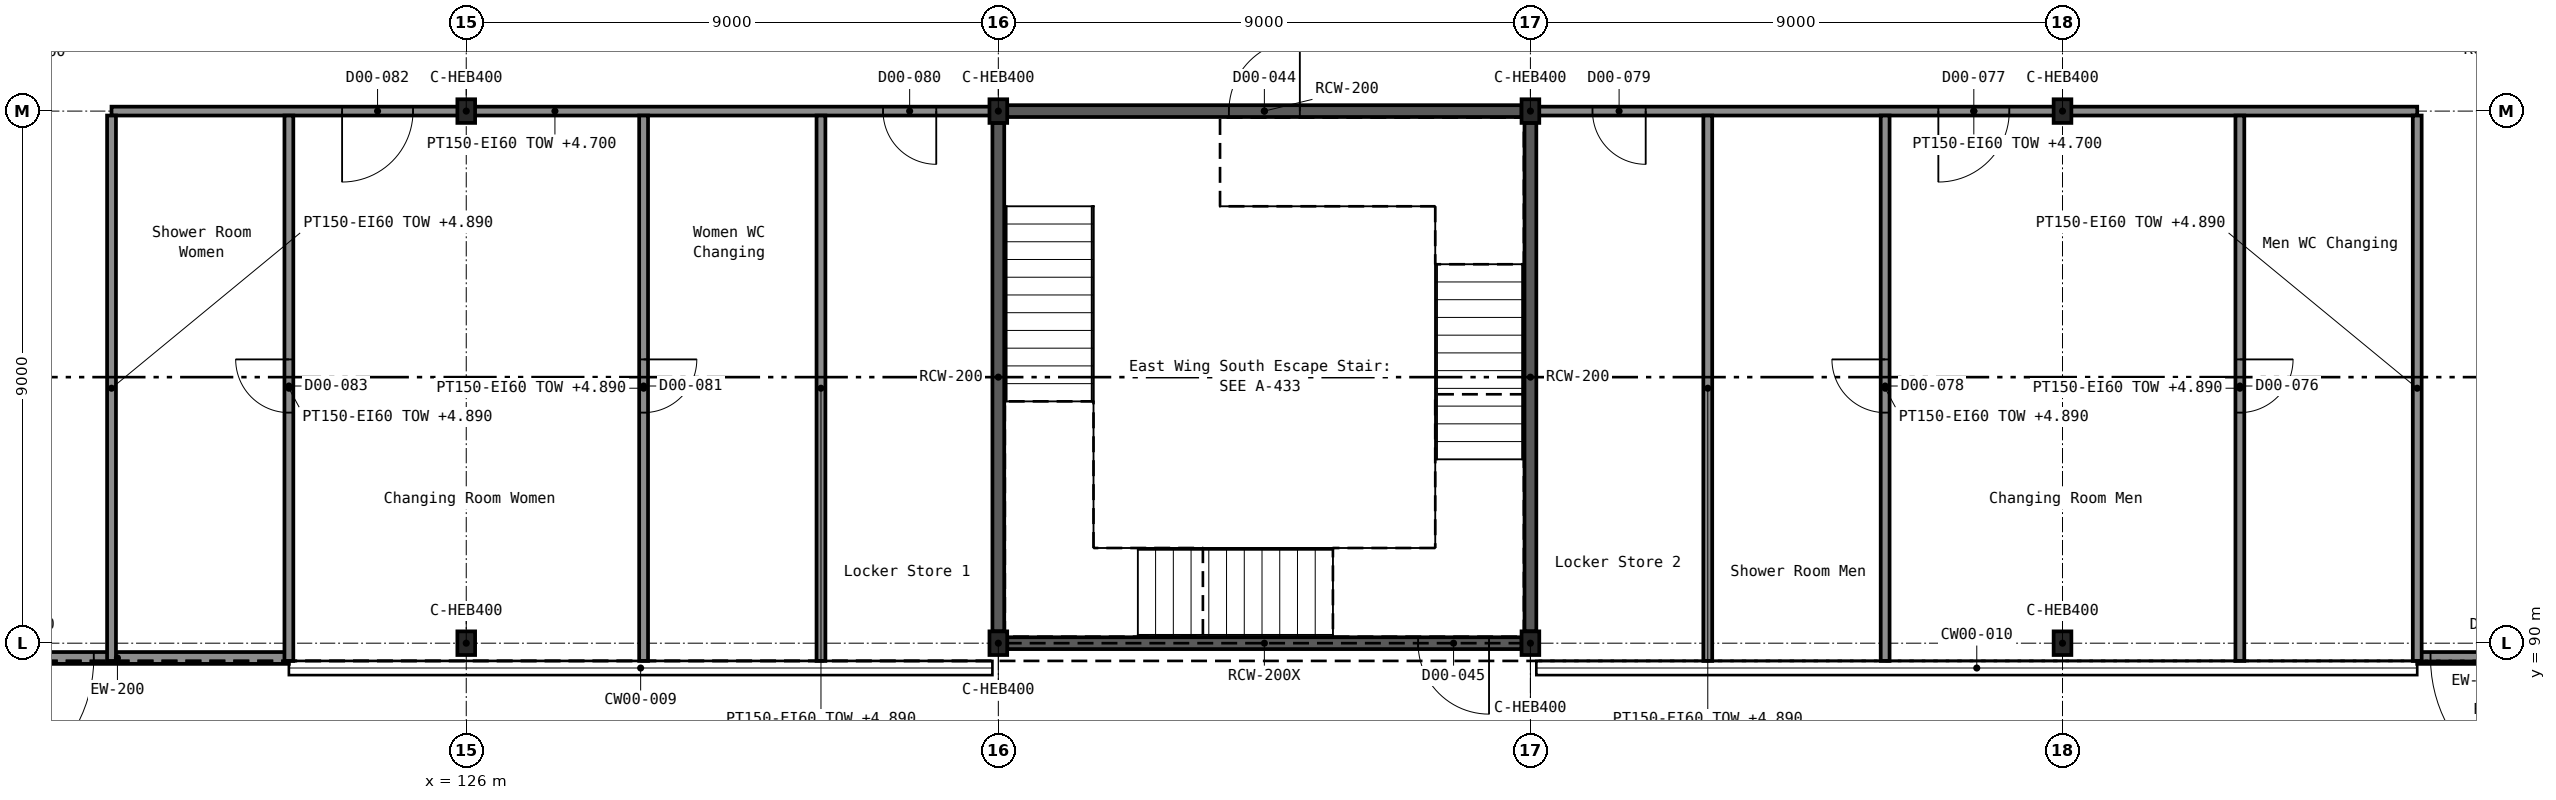
"""IFC4 building model, lengths in metres.
Left out: names, types, materials, properties, quantities, classifications, styles, units other than length and angle.
Written with IfcOpenShell. Run it as: python <this file> out.ifc"""

import sys

from ifc_helpers import new_model, si_unit, direction, frame, frame_2d, origin, origin_2d, place, context, subcontext, project, spatial, rectangle, i_section, extrude, element, fill, save


model = new_model("IFC4")
c1 = context("Model", 3, precision=1e-05, world=origin(), true_north=direction((0.0, 1.0)))
c2 = subcontext(c1, "Body", "Model", "MODEL_VIEW")
j1 = project(units=[si_unit("LENGTHUNIT", "METRE"), si_unit("PLANEANGLEUNIT", "RADIAN")], contexts=[c1])
p1 = place(None, origin())
s1 = spatial("IfcSite", under=j1, at=p1, CompositionType="ELEMENT")
p2 = place(p1, origin())
s2 = spatial("IfcBuilding", under=s1, at=p2, CompositionType="ELEMENT")
p3 = place(p2, origin())
s3 = spatial("IfcBuildingStorey", under=s2, at=p3, CompositionType="ELEMENT", Elevation=0.0)
for number, where, z_axis, x_axis in (
    (1, (126.0, 90.0, -0.3), (0.0, 0.0, 1.0), (1.0, 0.0, 0.0)),
    (2, (135.0, 90.0, -0.3), (0.0, 0.0, 1.0), (1.0, 0.0, 0.0)),
    (3, (144.0, 90.0, -0.3), (0.0, 0.0, 1.0), (1.0, 0.0, 0.0)),
    (4, (153.0, 90.0, -0.3), (0.0, 0.0, 1.0), (1.0, 0.0, 0.0)),
    (5, (126.0, 99.0, -0.3), (0.0, 0.0, 1.0), (1.0, 0.0, 0.0)),
    (6, (135.0, 99.0, -0.3), (0.0, 0.0, 1.0), (1.0, 0.0, 0.0)),
    (7, (144.0, 99.0, -0.3), (0.0, 0.0, 1.0), (1.0, 0.0, 0.0)),
    (8, (153.0, 99.0, -0.3), (0.0, 0.0, 1.0), (1.0, 0.0, 0.0)),
):
    element("IfcColumn", number, at=place(p3, frame(where, z_axis=z_axis, x_axis=x_axis)), inside=s3, PredefinedType="COLUMN", context=c2, shape_type="SweptSolid", body=[
        extrude(i_section(OverallWidth=0.3, OverallDepth=0.4, WebThickness=0.013, FlangeThickness=0.024, FilletRadius=0.027, at=origin_2d()), origin(), (0.0, 0.0, 1.0), 5.7),
    ])
p4 = place(p3, frame((117.2, 89.75, 0.0), z_axis=(0.0, 0.0, 1.0), x_axis=(1.0, 0.0, 0.0)))
e9 = element("IfcWall", 9, at=p4, inside=s3, PredefinedType="SOLIDWALL", context=c2, shape_type="SweptSolid", body=[
    extrude(rectangle(XDim=5.8, YDim=0.2, at=frame_2d((2.9, 0.0))), origin(), (0.0, 0.0, 1.0), 5.4),
])
p5 = place(p4, frame((0.1, 0.0, 0.0)))
e10 = element("IfcOpeningElement", 10, at=p5, cuts=e9, PredefinedType="OPENING", context=c2, shape_type="SweptSolid", body=[
    extrude(rectangle(XDim=2.4, YDim=2.4, at=frame_2d((1.2, 1.2))), frame((0.0, 0.111, 0.0), z_axis=(0.0, -1.0, 0.0), x_axis=(1.0, 0.0, 0.0)), (0.0, 0.0, 1.0), 0.222),
])
p6 = place(p3, frame((159.0, 89.75, 0.0), z_axis=(0.0, 0.0, 1.0), x_axis=(1.0, 0.0, 0.0)))
e11 = element("IfcWall", 11, at=p6, inside=s3, PredefinedType="SOLIDWALL", context=c2, shape_type="SweptSolid", body=[
    extrude(rectangle(XDim=2.85, YDim=0.2, at=frame_2d((1.425, 0.0))), origin(), (0.0, 0.0, 1.0), 5.4),
])
p7 = place(p6, frame((0.225, 0.0, 0.0)))
e12 = element("IfcOpeningElement", 12, at=p7, cuts=e11, PredefinedType="OPENING", context=c2, shape_type="SweptSolid", body=[
    extrude(rectangle(XDim=2.4, YDim=2.4, at=frame_2d((1.2, 1.2))), frame((0.0, 0.111, 0.0), z_axis=(0.0, -1.0, 0.0), x_axis=(1.0, 0.0, 0.0)), (0.0, 0.0, 1.0), 0.222),
])
p8 = place(p3, frame((135.15, 90.0, 0.0), z_axis=(0.0, 0.0, 1.0), x_axis=(1.0, 0.0, 0.0)))
e13 = element("IfcWall", 13, at=p8, inside=s3, PredefinedType="SHEAR", context=c2, shape_type="SweptSolid", body=[
    extrude(rectangle(XDim=8.7, YDim=0.2, at=frame_2d((4.35, 0.0))), origin(), (0.0, 0.0, 1.0), 5.4),
])
p9 = place(p8, frame((6.95, 0.0, 0.0)))
e14 = element("IfcOpeningElement", 14, at=p9, cuts=e13, PredefinedType="OPENING", context=c2, shape_type="SweptSolid", body=[
    extrude(rectangle(XDim=1.2, YDim=2.1, at=frame_2d((0.6, 1.05))), frame((0.0, 0.111, 0.0), z_axis=(0.0, -1.0, 0.0), x_axis=(1.0, 0.0, 0.0)), (0.0, 0.0, 1.0), 0.222),
])
p10 = place(p3, frame((135.15, 99.0, 0.0), z_axis=(0.0, 0.0, 1.0), x_axis=(1.0, 0.0, 0.0)))
e15 = element("IfcWall", 15, at=p10, inside=s3, PredefinedType="SHEAR", context=c2, shape_type="SweptSolid", body=[
    extrude(rectangle(XDim=8.7, YDim=0.2, at=frame_2d((4.35, 0.0))), origin(), (0.0, 0.0, 1.0), 5.4),
])
p11 = place(p10, frame((3.75, 0.0, 0.0)))
e16 = element("IfcOpeningElement", 16, at=p11, cuts=e15, PredefinedType="OPENING", context=c2, shape_type="SweptSolid", body=[
    extrude(rectangle(XDim=1.2, YDim=2.1, at=frame_2d((0.6, 1.05))), frame((0.0, 0.111, 0.0), z_axis=(0.0, -1.0, 0.0), x_axis=(1.0, 0.0, 0.0)), (0.0, 0.0, 1.0), 0.222),
])
for number, where, z_axis, x_axis in (
    (17, (135.0, 90.2, 0.0), (0.0, 0.0, 1.0), (0.0, 1.0, 0.0)),
    (18, (144.0, 90.2, 0.0), (0.0, 0.0, 1.0), (0.0, 1.0, 0.0)),
):
    element("IfcWall", number, at=place(p3, frame(where, z_axis=z_axis, x_axis=x_axis)), inside=s3, PredefinedType="SHEAR", context=c2, shape_type="SweptSolid", body=[
        extrude(rectangle(XDim=8.6, YDim=0.2, at=frame_2d((4.3, 0.0))), origin(), (0.0, 0.0, 1.0), 5.4),
    ])
p12 = place(p3, frame((120.0, 99.0, 0.0), z_axis=(0.0, 0.0, 1.0), x_axis=(1.0, 0.0, 0.0)))
e19 = element("IfcWall", 19, at=p12, inside=s3, PredefinedType="PARTITIONING", context=c2, shape_type="SweptSolid", body=[
    extrude(rectangle(XDim=15.0, YDim=0.15, at=frame_2d((7.5, 0.0))), origin(), (0.0, 0.0, 1.0), 4.7),
])
p13 = place(p12, frame((13.05, 0.0, 0.0)))
e20 = element("IfcOpeningElement", 20, at=p13, cuts=e19, PredefinedType="OPENING", context=c2, shape_type="SweptSolid", body=[
    extrude(rectangle(XDim=0.9, YDim=2.4, at=frame_2d((0.45, 1.2))), frame((0.0, 0.086, 0.0), z_axis=(0.0, -1.0, 0.0), x_axis=(1.0, 0.0, 0.0)), (0.0, 0.0, 1.0), 0.172),
])
p14 = place(p12, frame((3.9, 0.0, 0.0)))
e21 = element("IfcOpeningElement", 21, at=p14, cuts=e19, PredefinedType="OPENING", context=c2, shape_type="SweptSolid", body=[
    extrude(rectangle(XDim=1.2, YDim=2.1, at=frame_2d((0.6, 1.05))), frame((0.0, 0.086, 0.0), z_axis=(0.0, -1.0, 0.0), x_axis=(1.0, 0.0, 0.0)), (0.0, 0.0, 1.0), 0.172),
])
p15 = place(p3, frame((144.0, 99.0, 0.0), z_axis=(0.0, 0.0, 1.0), x_axis=(1.0, 0.0, 0.0)))
e22 = element("IfcWall", 22, at=p15, inside=s3, PredefinedType="PARTITIONING", context=c2, shape_type="SweptSolid", body=[
    extrude(rectangle(XDim=15.0, YDim=0.15, at=frame_2d((7.5, 0.0))), origin(), (0.0, 0.0, 1.0), 4.7),
])
p16 = place(p15, frame((6.9, 0.0, 0.0)))
e23 = element("IfcOpeningElement", 23, at=p16, cuts=e22, PredefinedType="OPENING", context=c2, shape_type="SweptSolid", body=[
    extrude(rectangle(XDim=1.2, YDim=2.1, at=frame_2d((0.6, 1.05))), frame((0.0, 0.086, 0.0), z_axis=(0.0, -1.0, 0.0), x_axis=(1.0, 0.0, 0.0)), (0.0, 0.0, 1.0), 0.172),
])
p17 = place(p15, frame((1.05, 0.0, 0.0)))
e24 = element("IfcOpeningElement", 24, at=p17, cuts=e22, PredefinedType="OPENING", context=c2, shape_type="SweptSolid", body=[
    extrude(rectangle(XDim=0.9, YDim=2.4, at=frame_2d((0.45, 1.2))), frame((0.0, 0.086, 0.0), z_axis=(0.0, -1.0, 0.0), x_axis=(1.0, 0.0, 0.0)), (0.0, 0.0, 1.0), 0.172),
])
p18 = place(p3, frame((120.0, 89.7, 0.0), z_axis=(0.0, 0.0, 1.0), x_axis=(0.0, 1.0, 0.0)))
e25 = element("IfcWall", 25, at=p18, inside=s3, PredefinedType="PARTITIONING", context=c2, shape_type="SweptSolid", body=[
    extrude(rectangle(XDim=9.225, YDim=0.15, at=frame_2d((4.613, 0.0))), origin(), (0.0, 0.0, 1.0), 4.89),
])
p19 = place(p3, frame((123.0, 89.7, 0.0), z_axis=(0.0, 0.0, 1.0), x_axis=(0.0, 1.0, 0.0)))
e26 = element("IfcWall", 26, at=p19, inside=s3, PredefinedType="PARTITIONING", context=c2, shape_type="SweptSolid", body=[
    extrude(rectangle(XDim=9.225, YDim=0.15, at=frame_2d((4.613, 0.0))), origin(), (0.0, 0.0, 1.0), 4.89),
])
p20 = place(p19, frame((4.2, 0.0, 0.0)))
e27 = element("IfcOpeningElement", 27, at=p20, cuts=e26, PredefinedType="OPENING", context=c2, shape_type="SweptSolid", body=[
    extrude(rectangle(XDim=0.9, YDim=2.1, at=frame_2d((0.45, 1.05))), frame((0.0, 0.086, 0.0), z_axis=(0.0, -1.0, 0.0), x_axis=(1.0, 0.0, 0.0)), (0.0, 0.0, 1.0), 0.172),
])
p21 = place(p3, frame((129.0, 89.7, 0.0), z_axis=(0.0, 0.0, 1.0), x_axis=(0.0, 1.0, 0.0)))
e28 = element("IfcWall", 28, at=p21, inside=s3, PredefinedType="PARTITIONING", context=c2, shape_type="SweptSolid", body=[
    extrude(rectangle(XDim=9.225, YDim=0.15, at=frame_2d((4.613, 0.0))), origin(), (0.0, 0.0, 1.0), 4.89),
])
p22 = place(p21, frame((4.2, 0.0, 0.0)))
e29 = element("IfcOpeningElement", 29, at=p22, cuts=e28, PredefinedType="OPENING", context=c2, shape_type="SweptSolid", body=[
    extrude(rectangle(XDim=0.9, YDim=2.1, at=frame_2d((0.45, 1.05))), frame((0.0, 0.086, 0.0), z_axis=(0.0, -1.0, 0.0), x_axis=(1.0, 0.0, 0.0)), (0.0, 0.0, 1.0), 0.172),
])
for number, where, z_axis, x_axis in (
    (30, (132.0, 89.7, 0.0), (0.0, 0.0, 1.0), (0.0, 1.0, 0.0)),
    (31, (147.0, 89.7, 0.0), (0.0, 0.0, 1.0), (0.0, 1.0, 0.0)),
):
    element("IfcWall", number, at=place(p3, frame(where, z_axis=z_axis, x_axis=x_axis)), inside=s3, PredefinedType="PARTITIONING", context=c2, shape_type="SweptSolid", body=[
        extrude(rectangle(XDim=9.225, YDim=0.15, at=frame_2d((4.613, 0.0))), origin(), (0.0, 0.0, 1.0), 4.89),
    ])
p23 = place(p3, frame((150.0, 89.7, 0.0), z_axis=(0.0, 0.0, 1.0), x_axis=(0.0, 1.0, 0.0)))
e32 = element("IfcWall", 32, at=p23, inside=s3, PredefinedType="PARTITIONING", context=c2, shape_type="SweptSolid", body=[
    extrude(rectangle(XDim=9.225, YDim=0.15, at=frame_2d((4.613, 0.0))), origin(), (0.0, 0.0, 1.0), 4.89),
])
p24 = place(p23, frame((4.2, 0.0, 0.0)))
e33 = element("IfcOpeningElement", 33, at=p24, cuts=e32, PredefinedType="OPENING", context=c2, shape_type="SweptSolid", body=[
    extrude(rectangle(XDim=0.9, YDim=2.1, at=frame_2d((0.45, 1.05))), frame((0.0, 0.086, 0.0), z_axis=(0.0, -1.0, 0.0), x_axis=(1.0, 0.0, 0.0)), (0.0, 0.0, 1.0), 0.172),
])
p25 = place(p3, frame((156.0, 89.7, 0.0), z_axis=(0.0, 0.0, 1.0), x_axis=(0.0, 1.0, 0.0)))
e34 = element("IfcWall", 34, at=p25, inside=s3, PredefinedType="PARTITIONING", context=c2, shape_type="SweptSolid", body=[
    extrude(rectangle(XDim=9.225, YDim=0.15, at=frame_2d((4.613, 0.0))), origin(), (0.0, 0.0, 1.0), 4.89),
])
p26 = place(p25, frame((4.2, 0.0, 0.0)))
e35 = element("IfcOpeningElement", 35, at=p26, cuts=e34, PredefinedType="OPENING", context=c2, shape_type="SweptSolid", body=[
    extrude(rectangle(XDim=0.9, YDim=2.1, at=frame_2d((0.45, 1.05))), frame((0.0, 0.086, 0.0), z_axis=(0.0, -1.0, 0.0), x_axis=(1.0, 0.0, 0.0)), (0.0, 0.0, 1.0), 0.172),
])
p27 = place(p3, frame((159.0, 89.7, 0.0), z_axis=(0.0, 0.0, 1.0), x_axis=(0.0, 1.0, 0.0)))
e36 = element("IfcWall", 36, at=p27, inside=s3, PredefinedType="PARTITIONING", context=c2, shape_type="SweptSolid", body=[
    extrude(rectangle(XDim=9.225, YDim=0.15, at=frame_2d((4.613, 0.0))), origin(), (0.0, 0.0, 1.0), 4.89),
])
p28 = place(p5, frame((2.4, 0.0, 0.0), z_axis=(0.0, 0.0, 1.0), x_axis=(-1.0, 0.0, 0.0)))
e37 = element("IfcDoor", 37, at=p28, inside=s3, OperationType="DOUBLE_DOOR_DOUBLE_SWING", PredefinedType="DOOR", context=c2, shape_type="SweptSolid", body=[
    extrude(rectangle(XDim=2.4, YDim=2.4, at=frame_2d((1.2, 1.2))), frame((0.0, 0.025, 0.0), z_axis=(0.0, -1.0, 0.0), x_axis=(1.0, 0.0, 0.0)), (0.0, 0.0, 1.0), 0.05),
])
fill(e10, e37)
p29 = place(p7, frame((2.4, 0.0, 0.0), z_axis=(0.0, 0.0, 1.0), x_axis=(-1.0, 0.0, 0.0)))
e38 = element("IfcDoor", 38, at=p29, inside=s3, OperationType="DOUBLE_DOOR_DOUBLE_SWING", PredefinedType="DOOR", context=c2, shape_type="SweptSolid", body=[
    extrude(rectangle(XDim=2.4, YDim=2.4, at=frame_2d((1.2, 1.2))), frame((0.0, 0.025, 0.0), z_axis=(0.0, -1.0, 0.0), x_axis=(1.0, 0.0, 0.0)), (0.0, 0.0, 1.0), 0.05),
])
fill(e12, e38)
p30 = place(p11, origin())
e39 = element("IfcDoor", 39, at=p30, inside=s3, OperationType="SINGLE_SWING_RIGHT", PredefinedType="DOOR", context=c2, shape_type="SweptSolid", body=[
    extrude(rectangle(XDim=1.2, YDim=2.1, at=frame_2d((0.6, 1.05))), frame((0.0, 0.025, 0.0), z_axis=(0.0, -1.0, 0.0), x_axis=(1.0, 0.0, 0.0)), (0.0, 0.0, 1.0), 0.05),
])
fill(e16, e39)
p31 = place(p9, frame((1.2, 0.0, 0.0), z_axis=(0.0, 0.0, 1.0), x_axis=(-1.0, 0.0, 0.0)))
e40 = element("IfcDoor", 40, at=p31, inside=s3, OperationType="SINGLE_SWING_LEFT", PredefinedType="DOOR", context=c2, shape_type="SweptSolid", body=[
    extrude(rectangle(XDim=1.2, YDim=2.1, at=frame_2d((0.6, 1.05))), frame((0.0, 0.025, 0.0), z_axis=(0.0, -1.0, 0.0), x_axis=(1.0, 0.0, 0.0)), (0.0, 0.0, 1.0), 0.05),
])
fill(e14, e40)
p32 = place(p26, frame((0.9, 0.0, 0.0), z_axis=(0.0, 0.0, 1.0), x_axis=(-1.0, 0.0, 0.0)))
e41 = element("IfcDoor", 41, at=p32, inside=s3, OperationType="SINGLE_SWING_LEFT", PredefinedType="DOOR", context=c2, shape_type="SweptSolid", body=[
    extrude(rectangle(XDim=0.9, YDim=2.1, at=frame_2d((0.45, 1.05))), frame((0.0, 0.025, 0.0), z_axis=(0.0, -1.0, 0.0), x_axis=(1.0, 0.0, 0.0)), (0.0, 0.0, 1.0), 0.05),
])
fill(e35, e41)
p33 = place(p16, frame((1.2, 0.0, 0.0), z_axis=(0.0, 0.0, 1.0), x_axis=(-1.0, 0.0, 0.0)))
e42 = element("IfcDoor", 42, at=p33, inside=s3, OperationType="SINGLE_SWING_RIGHT", PredefinedType="DOOR", context=c2, shape_type="SweptSolid", body=[
    extrude(rectangle(XDim=1.2, YDim=2.1, at=frame_2d((0.6, 1.05))), frame((0.0, 0.025, 0.0), z_axis=(0.0, -1.0, 0.0), x_axis=(1.0, 0.0, 0.0)), (0.0, 0.0, 1.0), 0.05),
])
fill(e23, e42)
p34 = place(p24, origin())
e43 = element("IfcDoor", 43, at=p34, inside=s3, OperationType="SINGLE_SWING_RIGHT", PredefinedType="DOOR", context=c2, shape_type="SweptSolid", body=[
    extrude(rectangle(XDim=0.9, YDim=2.1, at=frame_2d((0.45, 1.05))), frame((0.0, 0.025, 0.0), z_axis=(0.0, -1.0, 0.0), x_axis=(1.0, 0.0, 0.0)), (0.0, 0.0, 1.0), 0.05),
])
fill(e33, e43)
p35 = place(p17, frame((0.9, 0.0, 0.0), z_axis=(0.0, 0.0, 1.0), x_axis=(-1.0, 0.0, 0.0)))
e44 = element("IfcDoor", 44, at=p35, inside=s3, OperationType="SINGLE_SWING_LEFT", PredefinedType="DOOR", context=c2, shape_type="SweptSolid", body=[
    extrude(rectangle(XDim=0.9, YDim=2.4, at=frame_2d((0.45, 1.2))), frame((0.0, 0.025, 0.0), z_axis=(0.0, -1.0, 0.0), x_axis=(1.0, 0.0, 0.0)), (0.0, 0.0, 1.0), 0.05),
])
fill(e24, e44)
p36 = place(p13, frame((0.9, 0.0, 0.0), z_axis=(0.0, 0.0, 1.0), x_axis=(-1.0, 0.0, 0.0)))
e45 = element("IfcDoor", 45, at=p36, inside=s3, OperationType="SINGLE_SWING_LEFT", PredefinedType="DOOR", context=c2, shape_type="SweptSolid", body=[
    extrude(rectangle(XDim=0.9, YDim=2.4, at=frame_2d((0.45, 1.2))), frame((0.0, 0.025, 0.0), z_axis=(0.0, -1.0, 0.0), x_axis=(1.0, 0.0, 0.0)), (0.0, 0.0, 1.0), 0.05),
])
fill(e20, e45)
p37 = place(p22, frame((0.9, 0.0, 0.0), z_axis=(0.0, 0.0, 1.0), x_axis=(-1.0, 0.0, 0.0)))
e46 = element("IfcDoor", 46, at=p37, inside=s3, OperationType="SINGLE_SWING_LEFT", PredefinedType="DOOR", context=c2, shape_type="SweptSolid", body=[
    extrude(rectangle(XDim=0.9, YDim=2.1, at=frame_2d((0.45, 1.05))), frame((0.0, 0.025, 0.0), z_axis=(0.0, -1.0, 0.0), x_axis=(1.0, 0.0, 0.0)), (0.0, 0.0, 1.0), 0.05),
])
fill(e29, e46)
p38 = place(p14, frame((1.2, 0.0, 0.0), z_axis=(0.0, 0.0, 1.0), x_axis=(-1.0, 0.0, 0.0)))
e47 = element("IfcDoor", 47, at=p38, inside=s3, OperationType="SINGLE_SWING_RIGHT", PredefinedType="DOOR", context=c2, shape_type="SweptSolid", body=[
    extrude(rectangle(XDim=1.2, YDim=2.1, at=frame_2d((0.6, 1.05))), frame((0.0, 0.025, 0.0), z_axis=(0.0, -1.0, 0.0), x_axis=(1.0, 0.0, 0.0)), (0.0, 0.0, 1.0), 0.05),
])
fill(e21, e47)
p39 = place(p20, origin())
e48 = element("IfcDoor", 48, at=p39, inside=s3, OperationType="SINGLE_SWING_RIGHT", PredefinedType="DOOR", context=c2, shape_type="SweptSolid", body=[
    extrude(rectangle(XDim=0.9, YDim=2.1, at=frame_2d((0.45, 1.05))), frame((0.0, 0.025, 0.0), z_axis=(0.0, -1.0, 0.0), x_axis=(1.0, 0.0, 0.0)), (0.0, 0.0, 1.0), 0.05),
])
fill(e27, e48)
save(model, sys.argv[1])
